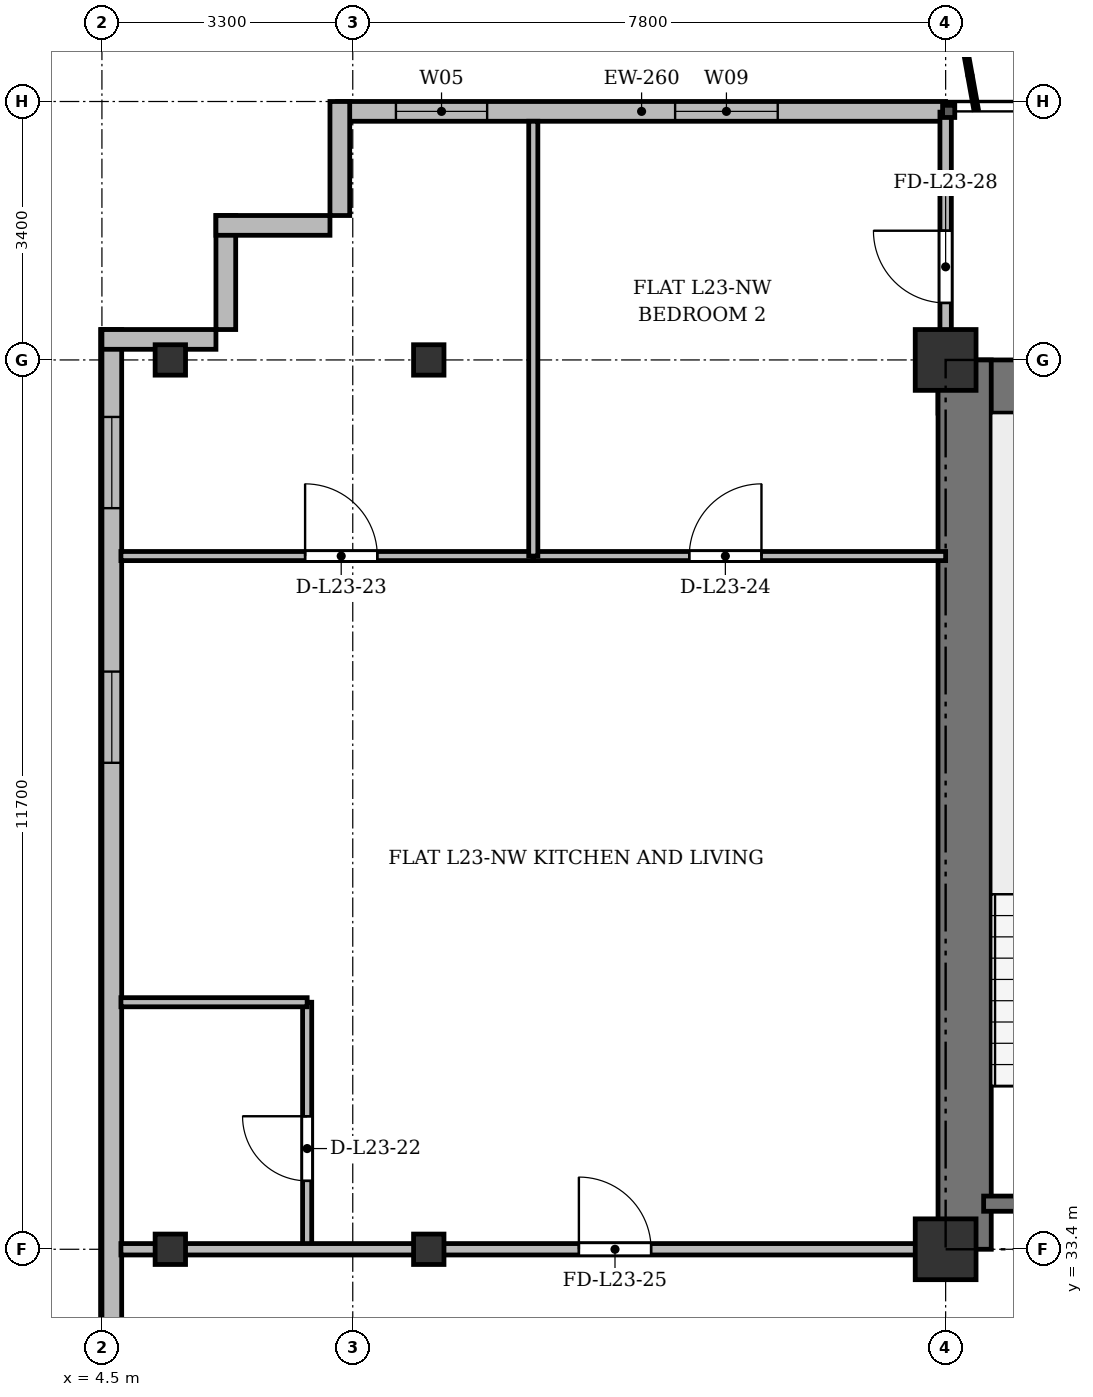
"""IFC4 building model, lengths in metres.
Left out: names, types, materials, properties, quantities, classifications, styles, units other than length and angle.
Written with IfcOpenShell. Run it as: python <this file> out.ifc"""

import sys

from ifc_helpers import new_model, si_unit, direction, frame, frame_2d, origin, origin_2d, place, context, subcontext, project, spatial, rectangle, i_section, extrude, source, transform, mapped, element, fill, save


model = new_model("IFC4")
c1 = context("Model", 3, precision=1e-05, world=origin(), true_north=direction((0.0, 1.0)))
c2 = subcontext(c1, "Body", "Model", "MODEL_VIEW")
j1 = project(units=[si_unit("LENGTHUNIT", "METRE"), si_unit("PLANEANGLEUNIT", "RADIAN")], contexts=[c1])
p1 = place(None, origin())
s1 = spatial("IfcSite", under=j1, at=p1, CompositionType="ELEMENT")
p2 = place(p1, origin())
s2 = spatial("IfcBuilding", under=s1, at=p2, CompositionType="ELEMENT")
p3 = place(p2, frame((0.0, 0.0, 92.5)))
s3 = spatial("IfcBuildingStorey", under=s2, at=p3, CompositionType="ELEMENT", Elevation=92.5)
m1 = source(origin(), c2, "Body", "SweptSolid", [
    extrude(i_section(OverallWidth=0.4, OverallDepth=0.4, WebThickness=0.022, FlangeThickness=0.035, at=origin_2d()), origin(), (0.0, 0.0, 1.0), 3.6),
])
for number, where, z_axis, x_axis in (
    (1, (5.4, 33.4, 0.0), (0.0, 0.0, 1.0), (1.0, 0.0, 0.0)),
    (2, (5.4, 45.1, 0.0), (0.0, 0.0, 1.0), (1.0, 0.0, 0.0)),
    (3, (8.8, 33.4, 0.0), (0.0, 0.0, 1.0), (1.0, 0.0, 0.0)),
    (4, (8.8, 45.1, 0.0), (0.0, 0.0, 1.0), (1.0, 0.0, 0.0)),
):
    element("IfcColumn", number, at=place(p3, frame(where, z_axis=z_axis, x_axis=x_axis)), inside=s3, PredefinedType="COLUMN", context=c2, shape_type="MappedRepresentation", body=[
        mapped(m1, transform((0.0, 0.0, 0.0), x_axis=(1.0, 0.0, 0.0), y_axis=(0.0, 1.0, 0.0), z_axis=(0.0, 0.0, 1.0), scale=1.0)),
    ])
m2 = source(origin(), c2, "Body", "SweptSolid", [
    extrude(rectangle(XDim=0.8, YDim=0.8, at=origin_2d()), origin(), (0.0, 0.0, 1.0), 3.6),
])
for number, where, z_axis, x_axis in (
    (5, (15.6, 33.4, 0.0), (0.0, 0.0, 1.0), (1.0, 0.0, 0.0)),
    (6, (15.6, 45.1, 0.0), (0.0, 0.0, 1.0), (1.0, 0.0, 0.0)),
):
    element("IfcColumn", number, at=place(p3, frame(where, z_axis=z_axis, x_axis=x_axis)), inside=s3, PredefinedType="COLUMN", context=c2, shape_type="MappedRepresentation", body=[
        mapped(m2, transform((0.0, 0.0, 0.0), x_axis=(1.0, 0.0, 0.0), y_axis=(0.0, 1.0, 0.0), z_axis=(0.0, 0.0, 1.0), scale=1.0)),
    ])
p4 = place(p3, frame((7.6, 48.37, 0.0), z_axis=(0.0, 0.0, 1.0), x_axis=(1.0, 0.0, 0.0)))
e7 = element("IfcWall", 7, at=p4, inside=s3, PredefinedType="SOLIDWALL", context=c2, shape_type="SweptSolid", body=[
    extrude(rectangle(XDim=8.0, YDim=0.26, at=frame_2d((4.0, 0.0))), origin(), (0.0, 0.0, 1.0), 3.34),
])
p5 = place(p4, frame((0.768, 0.0, 0.9)))
e8 = element("IfcOpeningElement", 8, at=p5, cuts=e7, PredefinedType="OPENING", context=c2, shape_type="SweptSolid", body=[
    extrude(rectangle(XDim=1.2, YDim=1.65, at=frame_2d((0.6, 0.825))), frame((0.0, 0.14, 0.0), z_axis=(0.0, -1.0, 0.0), x_axis=(1.0, 0.0, 0.0)), (0.0, 0.0, 1.0), 0.28),
])
p6 = place(p4, frame((4.441, 0.0, 0.9)))
e9 = element("IfcOpeningElement", 9, at=p6, cuts=e7, PredefinedType="OPENING", context=c2, shape_type="SweptSolid", body=[
    extrude(rectangle(XDim=1.35, YDim=1.5, at=frame_2d((0.675, 0.75))), frame((0.0, 0.14, 0.0), z_axis=(0.0, -1.0, 0.0), x_axis=(1.0, 0.0, 0.0)), (0.0, 0.0, 1.0), 0.28),
])
p7 = place(p3, frame((4.63, 5.9, 0.0), z_axis=(0.0, 0.0, 1.0), x_axis=(0.0, 1.0, 0.0)))
e10 = element("IfcWall", 10, at=p7, inside=s3, PredefinedType="SOLIDWALL", context=c2, shape_type="SweptSolid", body=[
    extrude(rectangle(XDim=39.6, YDim=0.26, at=frame_2d((19.8, 0.0))), origin(), (0.0, 0.0, 1.0), 3.34),
])
p8 = place(p7, frame((1.45, 0.0, 0.92)))
e11 = element("IfcOpeningElement", 11, at=p8, cuts=e10, PredefinedType="OPENING", context=c2, shape_type="SweptSolid", body=[
    extrude(rectangle(XDim=1.2, YDim=1.65, at=frame_2d((0.6, 0.825))), frame((0.0, 0.14, 0.0), z_axis=(0.0, -1.0, 0.0), x_axis=(1.0, 0.0, 0.0)), (0.0, 0.0, 1.0), 0.28),
])
p9 = place(p7, frame((4.3, 0.0, 0.92)))
e12 = element("IfcOpeningElement", 12, at=p9, cuts=e10, PredefinedType="OPENING", context=c2, shape_type="SweptSolid", body=[
    extrude(rectangle(XDim=2.4, YDim=2.1, at=frame_2d((1.2, 1.05))), frame((0.0, 0.14, 0.0), z_axis=(0.0, -1.0, 0.0), x_axis=(1.0, 0.0, 0.0)), (0.0, 0.0, 1.0), 0.28),
])
p10 = place(p7, frame((8.5, 0.0, 0.92)))
e13 = element("IfcOpeningElement", 13, at=p10, cuts=e10, PredefinedType="OPENING", context=c2, shape_type="SweptSolid", body=[
    extrude(rectangle(XDim=2.4, YDim=2.1, at=frame_2d((1.2, 1.05))), frame((0.0, 0.14, 0.0), z_axis=(0.0, -1.0, 0.0), x_axis=(1.0, 0.0, 0.0)), (0.0, 0.0, 1.0), 0.28),
])
p11 = place(p7, frame((33.9, 0.0, 0.92)))
e14 = element("IfcOpeningElement", 14, at=p11, cuts=e10, PredefinedType="OPENING", context=c2, shape_type="SweptSolid", body=[
    extrude(rectangle(XDim=1.2, YDim=1.65, at=frame_2d((0.6, 0.825))), frame((0.0, 0.14, 0.0), z_axis=(0.0, -1.0, 0.0), x_axis=(1.0, 0.0, 0.0)), (0.0, 0.0, 1.0), 0.28),
])
p12 = place(p7, frame((37.25, 0.0, 0.92)))
e15 = element("IfcOpeningElement", 15, at=p12, cuts=e10, PredefinedType="OPENING", context=c2, shape_type="SweptSolid", body=[
    extrude(rectangle(XDim=1.2, YDim=1.65, at=frame_2d((0.6, 0.825))), frame((0.0, 0.14, 0.0), z_axis=(0.0, -1.0, 0.0), x_axis=(1.0, 0.0, 0.0)), (0.0, 0.0, 1.0), 0.28),
])
p13 = place(p3, frame((4.5, 45.37, 0.0), z_axis=(0.0, 0.0, 1.0), x_axis=(1.0, 0.0, 0.0)))
e16 = element("IfcWall", 16, at=p13, inside=s3, PredefinedType="SOLIDWALL", context=c2, shape_type="SweptSolid", body=[
    extrude(rectangle(XDim=1.5, YDim=0.26, at=frame_2d((0.75, 0.0))), origin(), (0.0, 0.0, 1.0), 2.752),
])
for number, where, z_axis, x_axis in (
    (17, (6.13, 45.5, 0.0), (0.0, 0.0, 1.0), (0.0, 1.0, 0.0)),
    (18, (6.0, 46.87, 0.0), (0.0, 0.0, 1.0), (1.0, 0.0, 0.0)),
    (19, (7.63, 47.0, 0.0), (0.0, 0.0, 1.0), (0.0, 1.0, 0.0)),
):
    element("IfcWall", number, at=place(p3, frame(where, z_axis=z_axis, x_axis=x_axis)), inside=s3, PredefinedType="SOLIDWALL", context=c2, shape_type="SweptSolid", body=[
        extrude(rectangle(XDim=1.5, YDim=0.26, at=frame_2d((0.75, 0.0))), origin(), (0.0, 0.0, 1.0), 3.34),
    ])
p14 = place(p3, frame((15.5, 44.75, 0.0), z_axis=(0.0, 0.0, 1.0), x_axis=(1.0, 0.0, 0.0)))
e20 = element("IfcWall", 20, at=p14, inside=s3, PredefinedType="SHEAR", context=c2, shape_type="SweptSolid", body=[
    extrude(rectangle(XDim=43.4, YDim=0.7, at=frame_2d((21.7, 0.0))), origin(), (0.0, 0.0, 1.0), 3.34),
])
p15 = place(p3, frame((15.85, 33.4, 0.0), z_axis=(0.0, 0.0, 1.0), x_axis=(0.0, 1.0, 0.0)))
e21 = element("IfcWall", 21, at=p15, inside=s3, PredefinedType="SHEAR", context=c2, shape_type="SweptSolid", body=[
    extrude(rectangle(XDim=11.7, YDim=0.7, at=frame_2d((5.85, 0.0))), origin(), (0.0, 0.0, 1.0), 3.34),
])
p16 = place(p3, frame((16.1, 34.0, 0.0), z_axis=(0.0, 0.0, 1.0), x_axis=(1.0, 0.0, 0.0)))
e22 = element("IfcWall", 22, at=p16, inside=s3, PredefinedType="SHEAR", context=c2, shape_type="SweptSolid", body=[
    extrude(rectangle(XDim=3.4, YDim=0.2, at=frame_2d((1.7, 0.0))), origin(), (0.0, 0.0, 1.0), 3.34),
])
p17 = place(p3, frame((7.2, 33.4, 0.0), z_axis=(0.0, 0.0, 1.0), x_axis=(0.0, 1.0, 0.0)))
e23 = element("IfcWall", 23, at=p17, inside=s3, PredefinedType="PARTITIONING", context=c2, shape_type="SweptSolid", body=[
    extrude(rectangle(XDim=3.25, YDim=0.12, at=frame_2d((1.625, 0.0))), origin(), (0.0, 0.0, 1.0), 2.752),
])
p18 = place(p17, frame((0.9, 0.0, 0.0)))
e24 = element("IfcOpeningElement", 24, at=p18, cuts=e23, PredefinedType="OPENING", context=c2, shape_type="SweptSolid", body=[
    extrude(rectangle(XDim=0.85, YDim=2.1, at=frame_2d((0.425, 1.05))), frame((0.0, 0.07, 0.0), z_axis=(0.0, -1.0, 0.0), x_axis=(1.0, 0.0, 0.0)), (0.0, 0.0, 1.0), 0.14),
])
p19 = place(p3, frame((4.75, 36.65, 0.0), z_axis=(0.0, 0.0, 1.0), x_axis=(1.0, 0.0, 0.0)))
e25 = element("IfcWall", 25, at=p19, inside=s3, PredefinedType="PARTITIONING", context=c2, shape_type="SweptSolid", body=[
    extrude(rectangle(XDim=2.45, YDim=0.12, at=frame_2d((1.225, 0.0))), origin(), (0.0, 0.0, 1.0), 2.84),
])
p20 = place(p3, frame((4.75, 42.52, 0.0), z_axis=(0.0, 0.0, 1.0), x_axis=(1.0, 0.0, 0.0)))
e26 = element("IfcWall", 26, at=p20, inside=s3, PredefinedType="PARTITIONING", context=c2, shape_type="SweptSolid", body=[
    extrude(rectangle(XDim=5.425, YDim=0.12, at=frame_2d((2.712, 0.0))), origin(), (0.0, 0.0, 1.0), 2.84),
])
p21 = place(p20, frame((2.423, 0.0, 0.0)))
e27 = element("IfcOpeningElement", 27, at=p21, cuts=e26, PredefinedType="OPENING", context=c2, shape_type="SweptSolid", body=[
    extrude(rectangle(XDim=0.95, YDim=2.15, at=frame_2d((0.475, 1.075))), frame((0.0, 0.07, 0.0), z_axis=(0.0, -1.0, 0.0), x_axis=(1.0, 0.0, 0.0)), (0.0, 0.0, 1.0), 0.14),
])
p22 = place(p3, frame((10.175, 42.52, 0.0), z_axis=(0.0, 0.0, 1.0), x_axis=(1.0, 0.0, 0.0)))
e28 = element("IfcWall", 28, at=p22, inside=s3, PredefinedType="PARTITIONING", context=c2, shape_type="SweptSolid", body=[
    extrude(rectangle(XDim=5.425, YDim=0.12, at=frame_2d((2.712, 0.0))), origin(), (0.0, 0.0, 1.0), 2.84),
])
p23 = place(p22, frame((2.052, 0.0, 0.0)))
e29 = element("IfcOpeningElement", 29, at=p23, cuts=e28, PredefinedType="OPENING", context=c2, shape_type="SweptSolid", body=[
    extrude(rectangle(XDim=0.95, YDim=2.15, at=frame_2d((0.475, 1.075))), frame((0.0, 0.07, 0.0), z_axis=(0.0, -1.0, 0.0), x_axis=(1.0, 0.0, 0.0)), (0.0, 0.0, 1.0), 0.14),
])
p24 = place(p3, frame((10.175, 42.52, 0.0), z_axis=(0.0, 0.0, 1.0), x_axis=(0.0, 1.0, 0.0)))
e30 = element("IfcWall", 30, at=p24, inside=s3, PredefinedType="PARTITIONING", context=c2, shape_type="SweptSolid", body=[
    extrude(rectangle(XDim=5.72, YDim=0.12, at=frame_2d((2.86, 0.0))), origin(), (0.0, 0.0, 1.0), 2.752),
])
p25 = place(p3, frame((4.75, 33.4, 0.0), z_axis=(0.0, 0.0, 1.0), x_axis=(1.0, 0.0, 0.0)))
e31 = element("IfcWall", 31, at=p25, inside=s3, PredefinedType="PARTITIONING", context=c2, shape_type="SweptSolid", body=[
    extrude(rectangle(XDim=10.85, YDim=0.15, at=frame_2d((5.425, 0.0))), origin(), (0.0, 0.0, 1.0), 2.752),
])
p26 = place(p25, frame((6.025, 0.0, 0.0)))
e32 = element("IfcOpeningElement", 32, at=p26, cuts=e31, PredefinedType="OPENING", context=c2, shape_type="SweptSolid", body=[
    extrude(rectangle(XDim=0.95, YDim=2.15, at=frame_2d((0.475, 1.075))), frame((0.0, 0.085, 0.0), z_axis=(0.0, -1.0, 0.0), x_axis=(1.0, 0.0, 0.0)), (0.0, 0.0, 1.0), 0.17),
])
p27 = place(p3, frame((15.6, 44.75, 0.0), z_axis=(0.0, 0.0, 1.0), x_axis=(0.0, 1.0, 0.0)))
e33 = element("IfcWall", 33, at=p27, inside=s3, PredefinedType="PARTITIONING", context=c2, shape_type="SweptSolid", body=[
    extrude(rectangle(XDim=3.61, YDim=0.15, at=frame_2d((1.805, 0.0))), origin(), (0.0, 0.0, 1.0), 2.84),
])
p28 = place(p27, frame((1.1, 0.0, 0.0)))
e34 = element("IfcOpeningElement", 34, at=p28, cuts=e33, PredefinedType="OPENING", context=c2, shape_type="SweptSolid", body=[
    extrude(rectangle(XDim=0.95, YDim=2.15, at=frame_2d((0.475, 1.075))), frame((0.0, 0.085, 0.0), z_axis=(0.0, -1.0, 0.0), x_axis=(1.0, 0.0, 0.0)), (0.0, 0.0, 1.0), 0.17),
])
m3 = source(origin(), c2, "Body", "SweptSolid", [
    extrude(rectangle(XDim=1.2, YDim=1.65, at=frame_2d((0.6, 0.825))), frame((0.0, 0.03, 0.0), z_axis=(0.0, -1.0, 0.0), x_axis=(1.0, 0.0, 0.0)), (0.0, 0.0, 1.0), 0.06),
])
p29 = place(p5, origin())
e35 = element("IfcWindow", 35, at=p29, inside=s3, PartitioningType="SINGLE_PANEL", PredefinedType="WINDOW", context=c2, shape_type="MappedRepresentation", body=[
    mapped(m3, transform((0.0, 0.0, 0.0), x_axis=(1.0, 0.0, 0.0), y_axis=(0.0, 1.0, 0.0), z_axis=(0.0, 0.0, 1.0), scale=1.0)),
])
fill(e8, e35)
m4 = source(origin(), c2, "Body", "SweptSolid", [
    extrude(rectangle(XDim=1.35, YDim=1.5, at=frame_2d((0.675, 0.75))), frame((0.0, 0.03, 0.0), z_axis=(0.0, -1.0, 0.0), x_axis=(1.0, 0.0, 0.0)), (0.0, 0.0, 1.0), 0.06),
])
p30 = place(p6, origin())
e36 = element("IfcWindow", 36, at=p30, inside=s3, PartitioningType="SINGLE_PANEL", PredefinedType="WINDOW", context=c2, shape_type="MappedRepresentation", body=[
    mapped(m4, transform((0.0, 0.0, 0.0), x_axis=(1.0, 0.0, 0.0), y_axis=(0.0, 1.0, 0.0), z_axis=(0.0, 0.0, 1.0), scale=1.0)),
])
fill(e9, e36)
p31 = place(p11, origin())
e37 = element("IfcWindow", 37, at=p31, inside=s3, PartitioningType="SINGLE_PANEL", PredefinedType="WINDOW", context=c2, shape_type="MappedRepresentation", body=[
    mapped(m3, transform((0.0, 0.0, 0.0), x_axis=(1.0, 0.0, 0.0), y_axis=(0.0, 1.0, 0.0), z_axis=(0.0, 0.0, 1.0), scale=1.0)),
])
fill(e14, e37)
p32 = place(p12, origin())
e38 = element("IfcWindow", 38, at=p32, inside=s3, PartitioningType="SINGLE_PANEL", PredefinedType="WINDOW", context=c2, shape_type="MappedRepresentation", body=[
    mapped(m3, transform((0.0, 0.0, 0.0), x_axis=(1.0, 0.0, 0.0), y_axis=(0.0, 1.0, 0.0), z_axis=(0.0, 0.0, 1.0), scale=1.0)),
])
fill(e15, e38)
m5 = source(origin(), c2, "Body", "SweptSolid", [
    extrude(rectangle(XDim=0.85, YDim=2.1, at=frame_2d((0.425, 1.05))), frame((0.0, 0.025, 0.0), z_axis=(0.0, -1.0, 0.0), x_axis=(1.0, 0.0, 0.0)), (0.0, 0.0, 1.0), 0.05),
])
p33 = place(p18, origin())
e39 = element("IfcDoor", 39, at=p33, inside=s3, OperationType="SINGLE_SWING_RIGHT", PredefinedType="DOOR", context=c2, shape_type="MappedRepresentation", body=[
    mapped(m5, transform((0.0, 0.0, 0.0), x_axis=(1.0, 0.0, 0.0), y_axis=(0.0, 1.0, 0.0), z_axis=(0.0, 0.0, 1.0), scale=1.0)),
])
fill(e24, e39)
m6 = source(origin(), c2, "Body", "SweptSolid", [
    extrude(rectangle(XDim=0.95, YDim=2.15, at=frame_2d((0.475, 1.075))), frame((0.0, 0.025, 0.0), z_axis=(0.0, -1.0, 0.0), x_axis=(1.0, 0.0, 0.0)), (0.0, 0.0, 1.0), 0.05),
])
p34 = place(p21, origin())
e40 = element("IfcDoor", 40, at=p34, inside=s3, OperationType="SINGLE_SWING_LEFT", PredefinedType="DOOR", context=c2, shape_type="MappedRepresentation", body=[
    mapped(m6, transform((0.0, 0.0, 0.0), x_axis=(1.0, 0.0, 0.0), y_axis=(0.0, 1.0, 0.0), z_axis=(0.0, 0.0, 1.0), scale=1.0)),
])
fill(e27, e40)
p35 = place(p23, origin())
e41 = element("IfcDoor", 41, at=p35, inside=s3, OperationType="SINGLE_SWING_RIGHT", PredefinedType="DOOR", context=c2, shape_type="MappedRepresentation", body=[
    mapped(m6, transform((0.0, 0.0, 0.0), x_axis=(1.0, 0.0, 0.0), y_axis=(0.0, 1.0, 0.0), z_axis=(0.0, 0.0, 1.0), scale=1.0)),
])
fill(e29, e41)
p36 = place(p26, origin())
e42 = element("IfcDoor", 42, at=p36, inside=s3, OperationType="SINGLE_SWING_LEFT", PredefinedType="DOOR", context=c2, shape_type="MappedRepresentation", body=[
    mapped(m6, transform((0.0, 0.0, 0.0), x_axis=(1.0, 0.0, 0.0), y_axis=(0.0, 1.0, 0.0), z_axis=(0.0, 0.0, 1.0), scale=1.0)),
])
fill(e32, e42)
p37 = place(p28, origin())
e43 = element("IfcDoor", 43, at=p37, inside=s3, OperationType="SINGLE_SWING_RIGHT", PredefinedType="DOOR", context=c2, shape_type="MappedRepresentation", body=[
    mapped(m6, transform((0.0, 0.0, 0.0), x_axis=(1.0, 0.0, 0.0), y_axis=(0.0, 1.0, 0.0), z_axis=(0.0, 0.0, 1.0), scale=1.0)),
])
fill(e34, e43)
save(model, sys.argv[1])
